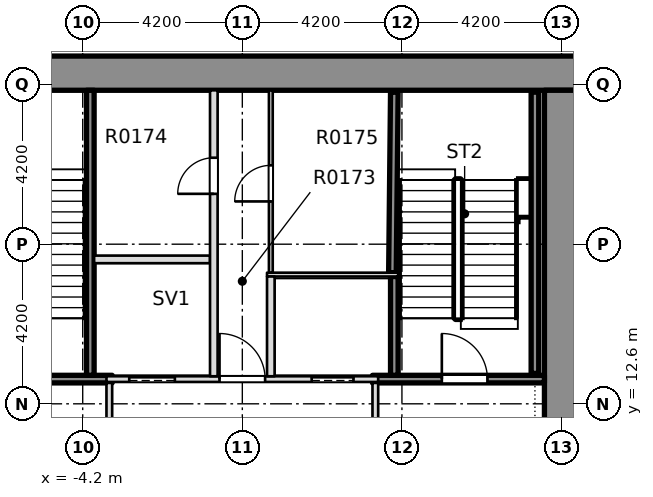
"""IFC4 building model, lengths in metres.
Left out: names, types, materials, properties, quantities, classifications, styles, units other than length and angle.
Written with IfcOpenShell. Run it as: python <this file> out.ifc"""

import sys

from ifc_helpers import new_model, si_unit, direction, frame, frame_2d, origin, place, context, subcontext, project, spatial, rectangle, extrude, element, fill, save


model = new_model("IFC4")
c1 = context("Model", 3, precision=1e-05, world=origin(), true_north=direction((0.0, 1.0)))
c2 = subcontext(c1, "Body", "Model", "MODEL_VIEW")
j1 = project(units=[si_unit("LENGTHUNIT", "METRE"), si_unit("PLANEANGLEUNIT", "RADIAN")], contexts=[c1])
p1 = place(None, origin())
s1 = spatial("IfcSite", under=j1, at=p1, CompositionType="ELEMENT")
p2 = place(p1, origin())
s2 = spatial("IfcBuilding", under=s1, at=p2, CompositionType="ELEMENT")
p3 = place(p2, frame((0.0, 0.0, 7.5)))
s3 = spatial("IfcBuildingStorey", under=s2, at=p3, CompositionType="ELEMENT", Elevation=7.5)
p4 = place(p3, frame((-11.7, 21.3, -0.4), z_axis=(0.0, 0.0, 1.0), x_axis=(1.0, 0.0, 0.0)))
e1 = element("IfcWall", 1, at=p4, inside=s3, PredefinedType="SOLIDWALL", context=c2, shape_type="SweptSolid", body=[
    extrude(rectangle(XDim=23.4, YDim=0.9, at=frame_2d((11.7, 0.0))), origin(), (0.0, 0.0, 1.0), 5.0),
])
p5 = place(p3, frame((8.4, -7.5, -0.4), z_axis=(0.0, 0.0, 1.0), x_axis=(0.0, 1.0, 0.0)))
e2 = element("IfcWall", 2, at=p5, inside=s3, PredefinedType="SHEAR", context=c2, shape_type="SweptSolid", body=[
    extrude(rectangle(XDim=28.35, YDim=0.9, at=frame_2d((14.175, 0.0))), origin(), (0.0, 0.0, 1.0), 5.0),
])
p6 = place(p5, frame((18.4, 0.0, 0.4)))
e3 = element("IfcOpeningElement", 3, at=p6, cuts=e2, PredefinedType="OPENING", context=c2, shape_type="SweptSolid", body=[
    extrude(rectangle(XDim=1.2, YDim=2.1, at=frame_2d((0.6, 1.05))), frame((0.0, 0.46, 0.0), z_axis=(0.0, -1.0, 0.0), x_axis=(1.0, 0.0, 0.0)), (0.0, 0.0, 1.0), 0.92),
])
p7 = place(p3, frame((-7.949, 13.25, 0.0), z_axis=(0.0, 0.0, 1.0), x_axis=(1.0, 0.0, 0.0)))
e4 = element("IfcWall", 4, at=p7, inside=s3, PredefinedType="SOLIDWALL", context=c2, shape_type="SweptSolid", body=[
    extrude(rectangle(XDim=4.524, YDim=0.2, at=frame_2d((2.262, 0.0))), origin(), (0.0, 0.0, 1.0), 4.6),
])
p8 = place(p7, frame((1.499, 0.0, 0.0)))
e5 = element("IfcOpeningElement", 5, at=p8, cuts=e4, PredefinedType="OPENING", context=c2, shape_type="SweptSolid", body=[
    extrude(rectangle(XDim=1.2, YDim=2.1, at=frame_2d((0.6, 1.05))), frame((0.0, 0.11, 0.0), z_axis=(0.0, -1.0, 0.0), x_axis=(1.0, 0.0, 0.0)), (0.0, 0.0, 1.0), 0.22),
])
p9 = place(p3, frame((-3.575, 13.25, 0.0), z_axis=(0.0, 0.0, 1.0), x_axis=(1.0, 0.0, 0.0)))
e6 = element("IfcWall", 6, at=p9, inside=s3, PredefinedType="PARTITIONING", context=c2, shape_type="SweptSolid", body=[
    extrude(rectangle(XDim=7.15, YDim=0.15, at=frame_2d((3.575, 0.0))), origin(), (0.0, 0.0, 1.0), 4.6),
])
p10 = place(p9, frame((0.6, 0.0, 0.0)))
e7 = element("IfcOpeningElement", 7, at=p10, cuts=e6, PredefinedType="OPENING", context=c2, shape_type="SweptSolid", body=[
    extrude(rectangle(XDim=1.2, YDim=2.1, at=frame_2d((0.6, 1.05))), frame((0.0, 0.085, 0.0), z_axis=(0.0, -1.0, 0.0), x_axis=(1.0, 0.0, 0.0)), (0.0, 0.0, 1.0), 0.17),
])
p11 = place(p9, frame((5.4, 0.0, 0.0)))
e8 = element("IfcOpeningElement", 8, at=p11, cuts=e6, PredefinedType="OPENING", context=c2, shape_type="SweptSolid", body=[
    extrude(rectangle(XDim=1.1, YDim=2.1, at=frame_2d((0.55, 1.05))), frame((0.0, 0.085, 0.0), z_axis=(0.0, -1.0, 0.0), x_axis=(1.0, 0.0, 0.0)), (0.0, 0.0, 1.0), 0.17),
])
p12 = place(p9, frame((2.975, 0.0, 0.0)))
e9 = element("IfcOpeningElement", 9, at=p12, cuts=e6, PredefinedType="OPENING", context=c2, shape_type="SweptSolid", body=[
    extrude(rectangle(XDim=1.2, YDim=2.1, at=frame_2d((0.6, 1.05))), frame((0.0, 0.085, 0.0), z_axis=(0.0, -1.0, 0.0), x_axis=(1.0, 0.0, 0.0)), (0.0, 0.0, 1.0), 0.17),
])
p13 = place(p3, frame((3.425, 13.25, 0.0), z_axis=(0.0, 0.0, 1.0), x_axis=(1.0, 0.0, 0.0)))
e10 = element("IfcWall", 10, at=p13, inside=s3, PredefinedType="SOLIDWALL", context=c2, shape_type="SweptSolid", body=[
    extrude(rectangle(XDim=4.524, YDim=0.2, at=frame_2d((2.262, 0.0))), origin(), (0.0, 0.0, 1.0), 4.6),
])
p14 = place(p13, frame((1.825, 0.0, 0.0)))
e11 = element("IfcOpeningElement", 11, at=p14, cuts=e10, PredefinedType="OPENING", context=c2, shape_type="SweptSolid", body=[
    extrude(rectangle(XDim=1.2, YDim=2.1, at=frame_2d((0.6, 1.05))), frame((0.0, 0.11, 0.0), z_axis=(0.0, -1.0, 0.0), x_axis=(1.0, 0.0, 0.0)), (0.0, 0.0, 1.0), 0.22),
])
p15 = place(p3, frame((0.65, 16.0, 0.0), z_axis=(0.0, 0.0, 1.0), x_axis=(1.0, 0.0, 0.0)))
e12 = element("IfcWall", 12, at=p15, inside=s3, PredefinedType="PARTITIONING", context=c2, shape_type="SweptSolid", body=[
    extrude(rectangle(XDim=3.45, YDim=0.1, at=frame_2d((1.725, 0.0))), origin(), (0.0, 0.0, 1.0), 4.6),
])
p16 = place(p3, frame((-3.9, 16.4, 0.0), z_axis=(0.0, 0.0, 1.0), x_axis=(1.0, 0.0, 0.0)))
e13 = element("IfcWall", 13, at=p16, inside=s3, PredefinedType="PARTITIONING", context=c2, shape_type="SweptSolid", body=[
    extrude(rectangle(XDim=3.05, YDim=0.2, at=frame_2d((1.525, 0.0))), origin(), (0.0, 0.0, 1.0), 4.6),
])
p17 = place(p3, frame((-4.0, 13.35, 0.0), z_axis=(0.0, 0.0, 1.0), x_axis=(0.0, 1.0, 0.0)))
e14 = element("IfcWall", 14, at=p17, inside=s3, PredefinedType="SOLIDWALL", context=c2, shape_type="SweptSolid", body=[
    extrude(rectangle(XDim=7.499, YDim=0.2, at=frame_2d((3.75, 0.0))), origin(), (0.0, 0.0, 1.0), 4.6),
])
p18 = place(p3, frame((-3.5, 10.075, 0.0), z_axis=(0.0, 0.0, 1.0), x_axis=(0.0, 1.0, 0.0)))
e15 = element("IfcWall", 15, at=p18, inside=s3, PredefinedType="PARTITIONING", context=c2, shape_type="SweptSolid", body=[
    extrude(rectangle(XDim=3.075, YDim=0.15, at=frame_2d((1.538, 0.0))), origin(), (0.0, 0.0, 1.0), 4.6),
])
p19 = place(p18, frame((0.925, 0.0, 0.0)))
e16 = element("IfcOpeningElement", 16, at=p19, cuts=e15, PredefinedType="OPENING", context=c2, shape_type="SweptSolid", body=[
    extrude(rectangle(XDim=1.2, YDim=2.1, at=frame_2d((0.6, 1.05))), frame((0.0, 0.085, 0.0), z_axis=(0.0, -1.0, 0.0), x_axis=(1.0, 0.0, 0.0)), (0.0, 0.0, 1.0), 0.17),
])
p20 = place(p3, frame((-0.75, 13.325, 0.0), z_axis=(0.0, 0.0, 1.0), x_axis=(0.0, 1.0, 0.0)))
e17 = element("IfcWall", 17, at=p20, inside=s3, PredefinedType="PARTITIONING", context=c2, shape_type="SweptSolid", body=[
    extrude(rectangle(XDim=7.524, YDim=0.2, at=frame_2d((3.762, 0.0))), origin(), (0.0, 0.0, 1.0), 4.6),
])
p21 = place(p20, frame((4.8, 0.0, 0.0)))
e18 = element("IfcOpeningElement", 18, at=p21, cuts=e17, PredefinedType="OPENING", context=c2, shape_type="SweptSolid", body=[
    extrude(rectangle(XDim=0.95, YDim=2.1, at=frame_2d((0.475, 1.05))), frame((0.0, 0.11, 0.0), z_axis=(0.0, -1.0, 0.0), x_axis=(1.0, 0.0, 0.0)), (0.0, 0.0, 1.0), 0.22),
])
p22 = place(p3, frame((0.75, 13.325, 0.0), z_axis=(0.0, 0.0, 1.0), x_axis=(0.0, 1.0, 0.0)))
e19 = element("IfcWall", 19, at=p22, inside=s3, PredefinedType="PARTITIONING", context=c2, shape_type="SweptSolid", body=[
    extrude(rectangle(XDim=2.625, YDim=0.2, at=frame_2d((1.312, 0.0))), origin(), (0.0, 0.0, 1.0), 4.6),
])
p23 = place(p3, frame((0.75, 16.05, 0.0), z_axis=(0.0, 0.0, 1.0), x_axis=(0.0, 1.0, 0.0)))
e20 = element("IfcWall", 20, at=p23, inside=s3, PredefinedType="PARTITIONING", context=c2, shape_type="SweptSolid", body=[
    extrude(rectangle(XDim=4.799, YDim=0.1, at=frame_2d((2.399, 0.0))), origin(), (0.0, 0.0, 1.0), 4.6),
])
p24 = place(p23, frame((1.875, 0.0, 0.0)))
e21 = element("IfcOpeningElement", 21, at=p24, cuts=e20, PredefinedType="OPENING", context=c2, shape_type="SweptSolid", body=[
    extrude(rectangle(XDim=0.95, YDim=2.1, at=frame_2d((0.475, 1.05))), frame((0.0, 0.06, 0.0), z_axis=(0.0, -1.0, 0.0), x_axis=(1.0, 0.0, 0.0)), (0.0, 0.0, 1.0), 0.12),
])
p25 = place(p3, frame((3.5, 10.075, 0.0), z_axis=(0.0, 0.0, 1.0), x_axis=(0.0, 1.0, 0.0)))
e22 = element("IfcWall", 22, at=p25, inside=s3, PredefinedType="PARTITIONING", context=c2, shape_type="SweptSolid", body=[
    extrude(rectangle(XDim=3.075, YDim=0.15, at=frame_2d((1.538, 0.0))), origin(), (0.0, 0.0, 1.0), 4.6),
])
p26 = place(p25, frame((0.925, 0.0, 0.0)))
e23 = element("IfcOpeningElement", 23, at=p26, cuts=e22, PredefinedType="OPENING", context=c2, shape_type="SweptSolid", body=[
    extrude(rectangle(XDim=1.2, YDim=2.1, at=frame_2d((0.6, 1.05))), frame((0.0, 0.085, 0.0), z_axis=(0.0, -1.0, 0.0), x_axis=(1.0, 0.0, 0.0)), (0.0, 0.0, 1.0), 0.17),
])
p27 = place(p3, frame((4.0, 13.35, 0.0), z_axis=(0.0, 0.0, 1.0), x_axis=(0.0, 1.0, 0.0)))
e24 = element("IfcWall", 24, at=p27, inside=s3, PredefinedType="SOLIDWALL", context=c2, shape_type="SweptSolid", body=[
    extrude(rectangle(XDim=2.6, YDim=0.2, at=frame_2d((1.3, 0.0))), origin(), (0.0, 0.0, 1.0), 4.6),
])
p28 = place(p3, frame((3.95, 16.05, 0.0), z_axis=(0.0, 0.0, 1.0), x_axis=(0.010538176883, 0.999944471872, 0.0)))
e25 = element("IfcWall", 25, at=p28, inside=s3, PredefinedType="SOLIDWALL", context=c2, shape_type="SweptSolid", body=[
    extrude(rectangle(XDim=4.749, YDim=0.2, at=frame_2d((2.375, 0.0))), origin(), (0.0, 0.0, 1.0), 4.6),
])
p29 = place(p3, frame((7.7, 13.4, 0.0), z_axis=(0.0, 0.0, 1.0), x_axis=(0.0, 1.0, 0.0)))
e26 = element("IfcWall", 26, at=p29, inside=s3, PredefinedType="SOLIDWALL", context=c2, shape_type="SweptSolid", body=[
    extrude(rectangle(XDim=7.4, YDim=0.2, at=frame_2d((3.7, 0.0))), origin(), (0.0, 0.0, 1.0), 4.6),
])
p30 = place(p14, origin())
e27 = element("IfcDoor", 27, at=p30, inside=s3, OperationType="SINGLE_SWING_RIGHT", PredefinedType="DOOR", context=c2, shape_type="SweptSolid", body=[
    extrude(rectangle(XDim=1.2, YDim=2.1, at=frame_2d((0.6, 1.05))), frame((0.0, 0.025, 0.0), z_axis=(0.0, -1.0, 0.0), x_axis=(1.0, 0.0, 0.0)), (0.0, 0.0, 1.0), 0.05),
])
fill(e11, e27)
p31 = place(p10, origin())
e28 = element("IfcDoor", 28, at=p31, inside=s3, OperationType="SLIDING_TO_RIGHT", PredefinedType="DOOR", context=c2, shape_type="SweptSolid", body=[
    extrude(rectangle(XDim=1.2, YDim=2.1, at=frame_2d((0.6, 1.05))), frame((0.0, 0.025, 0.0), z_axis=(0.0, -1.0, 0.0), x_axis=(1.0, 0.0, 0.0)), (0.0, 0.0, 1.0), 0.05),
])
fill(e7, e28)
p32 = place(p11, origin())
e29 = element("IfcDoor", 29, at=p32, inside=s3, OperationType="SLIDING_TO_LEFT", PredefinedType="DOOR", context=c2, shape_type="SweptSolid", body=[
    extrude(rectangle(XDim=1.1, YDim=2.1, at=frame_2d((0.55, 1.05))), frame((0.0, 0.025, 0.0), z_axis=(0.0, -1.0, 0.0), x_axis=(1.0, 0.0, 0.0)), (0.0, 0.0, 1.0), 0.05),
])
fill(e8, e29)
p33 = place(p12, origin())
e30 = element("IfcDoor", 30, at=p33, inside=s3, OperationType="SINGLE_SWING_RIGHT", PredefinedType="DOOR", context=c2, shape_type="SweptSolid", body=[
    extrude(rectangle(XDim=1.2, YDim=2.1, at=frame_2d((0.6, 1.05))), frame((0.0, 0.025, 0.0), z_axis=(0.0, -1.0, 0.0), x_axis=(1.0, 0.0, 0.0)), (0.0, 0.0, 1.0), 0.05),
])
fill(e9, e30)
p34 = place(p21, origin())
e31 = element("IfcDoor", 31, at=p34, inside=s3, OperationType="SINGLE_SWING_RIGHT", PredefinedType="DOOR", context=c2, shape_type="SweptSolid", body=[
    extrude(rectangle(XDim=0.95, YDim=2.1, at=frame_2d((0.475, 1.05))), frame((0.0, 0.025, 0.0), z_axis=(0.0, -1.0, 0.0), x_axis=(1.0, 0.0, 0.0)), (0.0, 0.0, 1.0), 0.05),
])
fill(e18, e31)
p35 = place(p24, origin())
e32 = element("IfcDoor", 32, at=p35, inside=s3, OperationType="SINGLE_SWING_LEFT", PredefinedType="DOOR", context=c2, shape_type="SweptSolid", body=[
    extrude(rectangle(XDim=0.95, YDim=2.1, at=frame_2d((0.475, 1.05))), frame((0.0, 0.025, 0.0), z_axis=(0.0, -1.0, 0.0), x_axis=(1.0, 0.0, 0.0)), (0.0, 0.0, 1.0), 0.05),
])
fill(e21, e32)
save(model, sys.argv[1])
